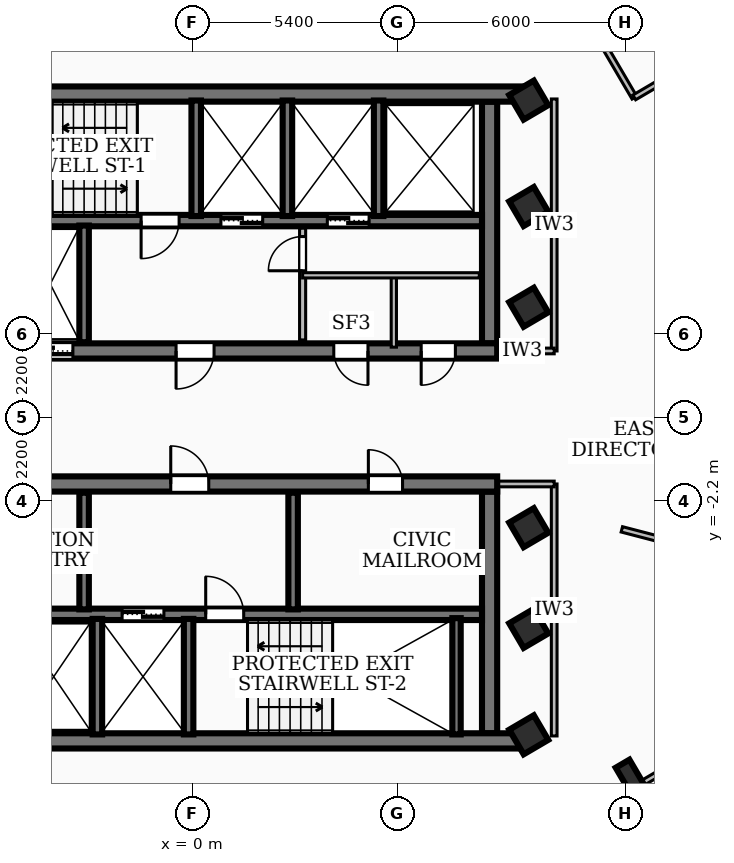
"""IFC4 building model, lengths in metres.
Left out: names, types, materials, properties, quantities, classifications, styles, units other than length and angle.
Written with IfcOpenShell. Run it as: python <this file> out.ifc"""

import sys

from ifc_helpers import new_model, si_unit, direction, frame, frame_2d, origin, origin_2d, place, context, subcontext, project, spatial, rectangle, i_section, extrude, element, fill, save


model = new_model("IFC4")
c1 = context("Model", 3, precision=1e-05, world=origin(), true_north=direction((0.0, 1.0)))
c2 = subcontext(c1, "Body", "Model", "MODEL_VIEW")
j1 = project(units=[si_unit("LENGTHUNIT", "METRE"), si_unit("PLANEANGLEUNIT", "RADIAN")], contexts=[c1])
p1 = place(None, origin())
s1 = spatial("IfcSite", under=j1, at=p1, CompositionType="ELEMENT")
p2 = place(p1, origin())
s2 = spatial("IfcBuilding", under=s1, at=p2, CompositionType="ELEMENT")
p3 = place(p2, frame((0.0, 0.0, 208.62)))
s3 = spatial("IfcBuildingStorey", under=s2, at=p3, CompositionType="ELEMENT", Elevation=208.62)
p4 = place(p3, frame((-8.78, 8.51, 0.0), z_axis=(0.0, 0.0, 1.0), x_axis=(1.0, 0.0, 0.0)))
e1 = element("IfcWall", 1, at=p4, inside=s3, PredefinedType="SHEAR", context=c2, shape_type="SweptSolid", body=[
    extrude(rectangle(XDim=17.56, YDim=0.4, at=frame_2d((8.78, 0.0))), origin(), (0.0, 0.0, 1.0), 3.16),
])
p5 = place(p3, frame((8.02, 1.75, 0.0), z_axis=(0.0, 0.0, 1.0), x_axis=(-1.0, 0.0, 0.0)))
e2 = element("IfcWall", 2, at=p5, inside=s3, PredefinedType="SHEAR", context=c2, shape_type="SweptSolid", body=[
    extrude(rectangle(XDim=16.04, YDim=0.4, at=frame_2d((8.02, 0.0))), origin(), (0.0, 0.0, 1.0), 3.16),
])
p6 = place(p5, frame((7.45, 0.0, 0.0)))
e3 = element("IfcOpeningElement", 3, at=p6, cuts=e2, PredefinedType="OPENING", context=c2, shape_type="SweptSolid", body=[
    extrude(rectangle(XDim=1.0, YDim=2.1, at=frame_2d((0.5, 1.05))), frame((0.0, 0.21, 0.0), z_axis=(0.0, -1.0, 0.0), x_axis=(1.0, 0.0, 0.0)), (0.0, 0.0, 1.0), 0.42),
])
p7 = place(p5, frame((14.285, 0.0, 0.0)))
e4 = element("IfcOpeningElement", 4, at=p7, cuts=e2, PredefinedType="OPENING", context=c2, shape_type="SweptSolid", body=[
    extrude(rectangle(XDim=1.05, YDim=2.15, at=frame_2d((0.525, 1.075))), frame((0.0, 0.21, 0.0), z_axis=(0.0, -1.0, 0.0), x_axis=(1.0, 0.0, 0.0)), (0.0, 0.0, 1.0), 0.42),
])
p8 = place(p5, frame((12.725, 0.0, 0.0)))
e5 = element("IfcOpeningElement", 5, at=p8, cuts=e2, PredefinedType="OPENING", context=c2, shape_type="SweptSolid", body=[
    extrude(rectangle(XDim=1.05, YDim=2.15, at=frame_2d((0.525, 1.075))), frame((0.0, 0.21, 0.0), z_axis=(0.0, -1.0, 0.0), x_axis=(1.0, 0.0, 0.0)), (0.0, 0.0, 1.0), 0.42),
])
p9 = place(p5, frame((11.165, 0.0, 0.0)))
e6 = element("IfcOpeningElement", 6, at=p9, cuts=e2, PredefinedType="OPENING", context=c2, shape_type="SweptSolid", body=[
    extrude(rectangle(XDim=1.05, YDim=2.15, at=frame_2d((0.525, 1.075))), frame((0.0, 0.21, 0.0), z_axis=(0.0, -1.0, 0.0), x_axis=(1.0, 0.0, 0.0)), (0.0, 0.0, 1.0), 0.42),
])
p10 = place(p5, frame((3.4, 0.0, 0.0)))
e7 = element("IfcOpeningElement", 7, at=p10, cuts=e2, PredefinedType="OPENING", context=c2, shape_type="SweptSolid", body=[
    extrude(rectangle(XDim=0.9, YDim=2.06, at=frame_2d((0.45, 1.03))), frame((0.0, 0.21, 0.0), z_axis=(0.0, -1.0, 0.0), x_axis=(1.0, 0.0, 0.0)), (0.0, 0.0, 1.0), 0.42),
])
p11 = place(p5, frame((1.1, 0.0, 0.0)))
e8 = element("IfcOpeningElement", 8, at=p11, cuts=e2, PredefinedType="OPENING", context=c2, shape_type="SweptSolid", body=[
    extrude(rectangle(XDim=0.9, YDim=2.06, at=frame_2d((0.45, 1.03))), frame((0.0, 0.21, 0.0), z_axis=(0.0, -1.0, 0.0), x_axis=(1.0, 0.0, 0.0)), (0.0, 0.0, 1.0), 0.42),
])
p12 = place(p3, frame((7.82, 8.31, 0.0), z_axis=(0.0, 0.0, 1.0), x_axis=(0.0, -1.0, 0.0)))
e9 = element("IfcWall", 9, at=p12, inside=s3, PredefinedType="SHEAR", context=c2, shape_type="SweptSolid", body=[
    extrude(rectangle(XDim=6.36, YDim=0.4, at=frame_2d((3.18, 0.0))), origin(), (0.0, 0.0, 1.0), 3.16),
])
p13 = place(p3, frame((7.62, 5.18, 0.0), z_axis=(0.0, 0.0, 1.0), x_axis=(-1.0, 0.0, 0.0)))
e10 = element("IfcWall", 10, at=p13, inside=s3, PredefinedType="SOLIDWALL", context=c2, shape_type="SweptSolid", body=[
    extrude(rectangle(XDim=15.24, YDim=0.3, at=frame_2d((7.62, 0.0))), origin(), (0.0, 0.0, 1.0), 3.16),
])
p14 = place(p13, frame((5.77, 0.0, 0.0)))
e11 = element("IfcOpeningElement", 11, at=p14, cuts=e10, PredefinedType="OPENING", context=c2, shape_type="SweptSolid", body=[
    extrude(rectangle(XDim=1.1, YDim=2.15, at=frame_2d((0.55, 1.075))), frame((0.0, 0.16, 0.0), z_axis=(0.0, -1.0, 0.0), x_axis=(1.0, 0.0, 0.0)), (0.0, 0.0, 1.0), 0.32),
])
p15 = place(p13, frame((2.97, 0.0, 0.0)))
e12 = element("IfcOpeningElement", 12, at=p15, cuts=e10, PredefinedType="OPENING", context=c2, shape_type="SweptSolid", body=[
    extrude(rectangle(XDim=1.1, YDim=2.15, at=frame_2d((0.55, 1.075))), frame((0.0, 0.16, 0.0), z_axis=(0.0, -1.0, 0.0), x_axis=(1.0, 0.0, 0.0)), (0.0, 0.0, 1.0), 0.32),
])
p16 = place(p13, frame((7.97, 0.0, 0.0)))
e13 = element("IfcOpeningElement", 13, at=p16, cuts=e10, PredefinedType="OPENING", context=c2, shape_type="SweptSolid", body=[
    extrude(rectangle(XDim=1.0, YDim=2.1, at=frame_2d((0.5, 1.05))), frame((0.0, 0.16, 0.0), z_axis=(0.0, -1.0, 0.0), x_axis=(1.0, 0.0, 0.0)), (0.0, 0.0, 1.0), 0.32),
])
p17 = place(p3, frame((8.78, -8.51, 0.0), z_axis=(0.0, 0.0, 1.0), x_axis=(-1.0, 0.0, 0.0)))
e14 = element("IfcWall", 14, at=p17, inside=s3, PredefinedType="SHEAR", context=c2, shape_type="SweptSolid", body=[
    extrude(rectangle(XDim=17.56, YDim=0.4, at=frame_2d((8.78, 0.0))), origin(), (0.0, 0.0, 1.0), 3.16),
])
p18 = place(p3, frame((-8.02, -1.75, 0.0), z_axis=(0.0, 0.0, 1.0), x_axis=(1.0, 0.0, 0.0)))
e15 = element("IfcWall", 15, at=p18, inside=s3, PredefinedType="SHEAR", context=c2, shape_type="SweptSolid", body=[
    extrude(rectangle(XDim=16.04, YDim=0.4, at=frame_2d((8.02, 0.0))), origin(), (0.0, 0.0, 1.0), 3.16),
])
p19 = place(p18, frame((7.45, 0.0, 0.0)))
e16 = element("IfcOpeningElement", 16, at=p19, cuts=e15, PredefinedType="OPENING", context=c2, shape_type="SweptSolid", body=[
    extrude(rectangle(XDim=1.0, YDim=2.1, at=frame_2d((0.5, 1.05))), frame((0.0, 0.21, 0.0), z_axis=(0.0, -1.0, 0.0), x_axis=(1.0, 0.0, 0.0)), (0.0, 0.0, 1.0), 0.42),
])
p20 = place(p18, frame((12.65, 0.0, 0.0)))
e17 = element("IfcOpeningElement", 17, at=p20, cuts=e15, PredefinedType="OPENING", context=c2, shape_type="SweptSolid", body=[
    extrude(rectangle(XDim=0.9, YDim=2.06, at=frame_2d((0.45, 1.03))), frame((0.0, 0.21, 0.0), z_axis=(0.0, -1.0, 0.0), x_axis=(1.0, 0.0, 0.0)), (0.0, 0.0, 1.0), 0.42),
])
p21 = place(p18, frame((2.25, 0.0, 0.0)))
e18 = element("IfcOpeningElement", 18, at=p21, cuts=e15, PredefinedType="OPENING", context=c2, shape_type="SweptSolid", body=[
    extrude(rectangle(XDim=0.9, YDim=2.06, at=frame_2d((0.45, 1.03))), frame((0.0, 0.21, 0.0), z_axis=(0.0, -1.0, 0.0), x_axis=(1.0, 0.0, 0.0)), (0.0, 0.0, 1.0), 0.42),
])
p22 = place(p3, frame((7.82, -1.95, 0.0), z_axis=(0.0, 0.0, 1.0), x_axis=(0.0, -1.0, 0.0)))
e19 = element("IfcWall", 19, at=p22, inside=s3, PredefinedType="SHEAR", context=c2, shape_type="SweptSolid", body=[
    extrude(rectangle(XDim=6.36, YDim=0.4, at=frame_2d((3.18, 0.0))), origin(), (0.0, 0.0, 1.0), 3.16),
])
p23 = place(p3, frame((-7.62, -5.18, 0.0), z_axis=(0.0, 0.0, 1.0), x_axis=(1.0, 0.0, 0.0)))
e20 = element("IfcWall", 20, at=p23, inside=s3, PredefinedType="SOLIDWALL", context=c2, shape_type="SweptSolid", body=[
    extrude(rectangle(XDim=15.24, YDim=0.3, at=frame_2d((7.62, 0.0))), origin(), (0.0, 0.0, 1.0), 3.16),
])
p24 = place(p23, frame((5.77, 0.0, 0.0)))
e21 = element("IfcOpeningElement", 21, at=p24, cuts=e20, PredefinedType="OPENING", context=c2, shape_type="SweptSolid", body=[
    extrude(rectangle(XDim=1.1, YDim=2.15, at=frame_2d((0.55, 1.075))), frame((0.0, 0.16, 0.0), z_axis=(0.0, -1.0, 0.0), x_axis=(1.0, 0.0, 0.0)), (0.0, 0.0, 1.0), 0.32),
])
p25 = place(p23, frame((7.97, 0.0, 0.0)))
e22 = element("IfcOpeningElement", 22, at=p25, cuts=e20, PredefinedType="OPENING", context=c2, shape_type="SweptSolid", body=[
    extrude(rectangle(XDim=1.0, YDim=2.1, at=frame_2d((0.5, 1.05))), frame((0.0, 0.16, 0.0), z_axis=(0.0, -1.0, 0.0), x_axis=(1.0, 0.0, 0.0)), (0.0, 0.0, 1.0), 0.32),
])
p26 = place(p3, frame((6.95, -8.34, 0.0), z_axis=(0.0, 0.0, 1.0), x_axis=(0.0, 1.0, 0.0)))
e23 = element("IfcWall", 23, at=p26, inside=s3, PredefinedType="SOLIDWALL", context=c2, shape_type="SweptSolid", body=[
    extrude(rectangle(XDim=3.06, YDim=0.22, at=frame_2d((1.53, 0.0))), origin(), (0.0, 0.0, 1.0), 3.16),
])
for number, where, z_axis, x_axis in (
    (24, (0.1, 5.3, 0.0), (0.0, 0.0, 1.0), (0.0, 1.0, 0.0)),
    (25, (2.5, 5.3, 0.0), (0.0, 0.0, 1.0), (0.0, 1.0, 0.0)),
    (26, (4.9, 5.3, 0.0), (0.0, 0.0, 1.0), (0.0, 1.0, 0.0)),
):
    element("IfcWall", number, at=place(p3, frame(where, z_axis=z_axis, x_axis=x_axis)), inside=s3, PredefinedType="SOLIDWALL", context=c2, shape_type="SweptSolid", body=[
        extrude(rectangle(XDim=3.04, YDim=0.25, at=frame_2d((1.52, 0.0))), origin(), (0.0, 0.0, 1.0), 3.16),
    ])
p27 = place(p3, frame((-2.85, 1.98, 0.0), z_axis=(0.0, 0.0, 1.0), x_axis=(0.0, 1.0, 0.0)))
e27 = element("IfcWall", 27, at=p27, inside=s3, PredefinedType="SOLIDWALL", context=c2, shape_type="SweptSolid", body=[
    extrude(rectangle(XDim=3.07, YDim=0.25, at=frame_2d((1.535, 0.0))), origin(), (0.0, 0.0, 1.0), 3.16),
])
for number, where, z_axis, x_axis in (
    (28, (-0.1, -8.34, 0.0), (0.0, 0.0, 1.0), (0.0, 1.0, 0.0)),
    (29, (-2.5, -8.34, 0.0), (0.0, 0.0, 1.0), (0.0, 1.0, 0.0)),
):
    element("IfcWall", number, at=place(p3, frame(where, z_axis=z_axis, x_axis=x_axis)), inside=s3, PredefinedType="SOLIDWALL", context=c2, shape_type="SweptSolid", body=[
        extrude(rectangle(XDim=3.04, YDim=0.25, at=frame_2d((1.52, 0.0))), origin(), (0.0, 0.0, 1.0), 3.16),
    ])
for number, where, z_axis, x_axis in (
    (30, (-2.85, -5.05, 0.0), (0.0, 0.0, 1.0), (0.0, 1.0, 0.0)),
    (31, (2.65, -5.05, 0.0), (0.0, 0.0, 1.0), (0.0, 1.0, 0.0)),
):
    element("IfcWall", number, at=place(p3, frame(where, z_axis=z_axis, x_axis=x_axis)), inside=s3, PredefinedType="SOLIDWALL", context=c2, shape_type="SweptSolid", body=[
        extrude(rectangle(XDim=3.07, YDim=0.25, at=frame_2d((1.535, 0.0))), origin(), (0.0, 0.0, 1.0), 3.16),
    ])
for number, where, z_axis, x_axis in (
    (32, (8.85, -5.55, 0.0), (0.0, 0.0, 1.0), (0.863, 0.506, 0.0)),
    (33, (8.85, -2.9, 0.0), (0.0, 0.0, 1.0), (0.863, 0.506, 0.0)),
    (34, (8.85, 2.9, 0.0), (0.0, 0.0, 1.0), (0.863, 0.506, 0.0)),
    (35, (8.85, 5.55, 0.0), (0.0, 0.0, 1.0), (0.863, 0.506, 0.0)),
    (36, (8.85, -8.35, 0.0), (0.0, 0.0, 1.0), (0.863, 0.506, 0.0)),
    (37, (8.85, 8.35, 0.0), (0.0, 0.0, 1.0), (0.863, 0.506, 0.0)),
):
    element("IfcColumn", number, at=place(p3, frame(where, z_axis=z_axis, x_axis=x_axis)), inside=s3, PredefinedType="COLUMN", context=c2, shape_type="SweptSolid", body=[
        extrude(rectangle(XDim=0.75, YDim=0.75, at=origin_2d()), origin(), (0.0, 0.0, 1.0), 3.42),
    ])
p28 = place(p3, frame((11.554, -9.51, 0.0), z_axis=(0.0, 0.0, 1.0), x_axis=(0.862513669207, 0.506033764121, 0.0)))
e38 = element("IfcColumn", 38, at=p28, inside=s3, PredefinedType="COLUMN", context=c2, shape_type="SweptSolid", body=[
    extrude(i_section(OverallWidth=0.418, OverallDepth=0.927, WebThickness=0.019, FlangeThickness=0.032, at=origin_2d()), origin(), (0.0, 0.0, 1.0), 3.42),
])
p29 = place(p3, frame((2.9, 2.04, 0.0), z_axis=(0.0, 0.0, 1.0), x_axis=(0.0, 1.0, 0.0)))
e39 = element("IfcWall", 39, at=p29, inside=s3, PredefinedType="PARTITIONING", context=c2, shape_type="SweptSolid", body=[
    extrude(rectangle(XDim=2.94, YDim=0.16, at=frame_2d((1.47, 0.0))), origin(), (0.0, 0.0, 1.0), 2.39),
])
p30 = place(p29, frame((1.82, 0.0, 0.0)))
e40 = element("IfcOpeningElement", 40, at=p30, cuts=e39, PredefinedType="OPENING", context=c2, shape_type="SweptSolid", body=[
    extrude(rectangle(XDim=0.9, YDim=2.06, at=frame_2d((0.45, 1.03))), frame((0.0, 0.09, 0.0), z_axis=(0.0, -1.0, 0.0), x_axis=(1.0, 0.0, 0.0)), (0.0, 0.0, 1.0), 0.18),
])
p31 = place(p3, frame((2.9, 3.74, 0.0), z_axis=(0.0, 0.0, 1.0), x_axis=(1.0, 0.0, 0.0)))
e41 = element("IfcWall", 41, at=p31, inside=s3, PredefinedType="PARTITIONING", context=c2, shape_type="SweptSolid", body=[
    extrude(rectangle(XDim=4.65, YDim=0.138, at=frame_2d((2.325, 0.0))), origin(), (0.0, 0.0, 1.0), 3.16),
])
p32 = place(p3, frame((5.3, 1.85, 0.0), z_axis=(0.0, 0.0, 1.0), x_axis=(0.0, 1.0, 0.0)))
e42 = element("IfcWall", 42, at=p32, inside=s3, PredefinedType="PARTITIONING", context=c2, shape_type="SweptSolid", body=[
    extrude(rectangle(XDim=1.89, YDim=0.138, at=frame_2d((0.945, 0.0))), origin(), (0.0, 0.0, 1.0), 2.39),
])
p33 = place(p3, frame((9.52, 1.75, 0.0), z_axis=(0.0, 0.0, 1.0), x_axis=(0.0, 1.0, 0.0)))
e43 = element("IfcWall", 43, at=p33, inside=s3, PredefinedType="PARTITIONING", context=c2, shape_type="SweptSolid", body=[
    extrude(rectangle(XDim=6.63, YDim=0.15, at=frame_2d((3.315, 0.0))), origin(), (0.0, 0.0, 1.0), 2.53),
])
p34 = place(p3, frame((7.85, 1.75, 0.0), z_axis=(0.0, 0.0, 1.0), x_axis=(1.0, 0.0, 0.0)))
e44 = element("IfcWall", 44, at=p34, inside=s3, PredefinedType="PARTITIONING", context=c2, shape_type="SweptSolid", body=[
    extrude(rectangle(XDim=1.67, YDim=0.15, at=frame_2d((0.835, 0.0))), origin(), (0.0, 0.0, 1.0), 2.39),
])
p35 = place(p3, frame((9.52, -8.38, 0.0), z_axis=(0.0, 0.0, 1.0), x_axis=(0.0, 1.0, 0.0)))
e45 = element("IfcWall", 45, at=p35, inside=s3, PredefinedType="PARTITIONING", context=c2, shape_type="SweptSolid", body=[
    extrude(rectangle(XDim=6.63, YDim=0.15, at=frame_2d((3.315, 0.0))), origin(), (0.0, 0.0, 1.0), 3.16),
])
p36 = place(p3, frame((7.85, -1.75, 0.0), z_axis=(0.0, 0.0, 1.0), x_axis=(1.0, 0.0, 0.0)))
e46 = element("IfcWall", 46, at=p36, inside=s3, PredefinedType="PARTITIONING", context=c2, shape_type="SweptSolid", body=[
    extrude(rectangle(XDim=1.67, YDim=0.15, at=frame_2d((0.835, 0.0))), origin(), (0.0, 0.0, 1.0), 2.39),
])
p37 = place(p3, frame((11.3, -2.944, 0.0), z_axis=(0.0, 0.0, 1.0), x_axis=(0.967711624716, -0.252059936106, 0.0)))
e47 = element("IfcWall", 47, at=p37, inside=s3, PredefinedType="PARTITIONING", context=c2, shape_type="SweptSolid", body=[
    extrude(rectangle(XDim=8.018, YDim=0.145, at=frame_2d((4.009, 0.0))), origin(), (0.0, 0.0, 1.0), 3.16),
])
p38 = place(p3, frame((11.632, 8.413, 0.0), z_axis=(0.0, 0.0, 1.0), x_axis=(-0.506057561451, 0.862499706955, 0.0)))
e48 = element("IfcWall", 48, at=p38, inside=s3, PredefinedType="PARTITIONING", context=c2, shape_type="SweptSolid", body=[
    extrude(rectangle(XDim=7.95, YDim=0.145, at=frame_2d((3.975, 0.0))), origin(), (0.0, 0.0, 1.0), 2.53),
])
p39 = place(p3, frame((14.654, 10.198, 0.0), z_axis=(0.0, 0.0, 1.0), x_axis=(-0.862375516706, -0.506269165747, 0.0)))
e49 = element("IfcWall", 49, at=p39, inside=s3, PredefinedType="PARTITIONING", context=c2, shape_type="SweptSolid", body=[
    extrude(rectangle(XDim=3.51, YDim=0.145, at=frame_2d((1.755, 0.0))), origin(), (0.0, 0.0, 1.0), 2.53),
])
p40 = place(p39, frame((1.305, 0.0, 0.0)))
e50 = element("IfcOpeningElement", 50, at=p40, cuts=e49, PredefinedType="OPENING", context=c2, shape_type="SweptSolid", body=[
    extrude(rectangle(XDim=1.3, YDim=2.1, at=frame_2d((0.65, 1.05))), frame((0.0, 0.083, 0.0), z_axis=(0.0, -1.0, 0.0), x_axis=(1.0, 0.0, 0.0)), (0.0, 0.0, 1.0), 0.165),
])
p41 = place(p3, frame((12.198, 14.385, 0.0), z_axis=(0.0, 0.0, 1.0), x_axis=(0.506037527975, -0.862511460956, 0.0)))
e51 = element("IfcWall", 51, at=p41, inside=s3, PredefinedType="PARTITIONING", context=c2, shape_type="SweptSolid", body=[
    extrude(rectangle(XDim=12.469, YDim=0.145, at=frame_2d((6.235, 0.0))), origin(), (0.0, 0.0, 1.0), 2.53),
])
p42 = place(p41, frame((6.655, 0.0, 0.0)))
e52 = element("IfcOpeningElement", 52, at=p42, cuts=e51, PredefinedType="OPENING", context=c2, shape_type="SweptSolid", body=[
    extrude(rectangle(XDim=0.86, YDim=2.04, at=frame_2d((0.43, 1.02))), frame((0.0, 0.083, 0.0), z_axis=(0.0, -1.0, 0.0), x_axis=(1.0, 0.0, 0.0)), (0.0, 0.0, 1.0), 0.165),
])
p43 = place(p41, frame((5.455, 0.0, 0.0)))
e53 = element("IfcOpeningElement", 53, at=p43, cuts=e51, PredefinedType="OPENING", context=c2, shape_type="SweptSolid", body=[
    extrude(rectangle(XDim=0.86, YDim=2.04, at=frame_2d((0.43, 1.02))), frame((0.0, 0.083, 0.0), z_axis=(0.0, -1.0, 0.0), x_axis=(1.0, 0.0, 0.0)), (0.0, 0.0, 1.0), 0.165),
])
p44 = place(p3, frame((-15.873, 7.255, 0.0), z_axis=(0.0, 0.0, 1.0), x_axis=(0.862498672631, 0.506059324299, 0.0)))
e54 = element("IfcWall", 54, at=p44, inside=s3, PredefinedType="PARTITIONING", context=c2, shape_type="SweptSolid", body=[
    extrude(rectangle(XDim=20.039, YDim=0.145, at=frame_2d((10.02, 0.0))), origin(), (0.0, 0.0, 1.0), 2.53),
])
p45 = place(p44, frame((9.42, 0.0, 0.0)))
e55 = element("IfcOpeningElement", 55, at=p45, cuts=e54, PredefinedType="OPENING", context=c2, shape_type="SweptSolid", body=[
    extrude(rectangle(XDim=1.2, YDim=2.1, at=frame_2d((0.6, 1.05))), frame((0.0, 0.083, 0.0), z_axis=(0.0, -1.0, 0.0), x_axis=(1.0, 0.0, 0.0)), (0.0, 0.0, 1.0), 0.165),
])
p46 = place(p3, frame((15.873, -7.255, 0.0), z_axis=(0.0, 0.0, 1.0), x_axis=(-0.862498672631, -0.506059324299, 0.0)))
e56 = element("IfcWall", 56, at=p46, inside=s3, PredefinedType="PARTITIONING", context=c2, shape_type="SweptSolid", body=[
    extrude(rectangle(XDim=20.039, YDim=0.145, at=frame_2d((10.02, 0.0))), origin(), (0.0, 0.0, 1.0), 2.53),
])
p47 = place(p46, frame((9.42, 0.0, 0.0)))
e57 = element("IfcOpeningElement", 57, at=p47, cuts=e56, PredefinedType="OPENING", context=c2, shape_type="SweptSolid", body=[
    extrude(rectangle(XDim=1.2, YDim=2.1, at=frame_2d((0.6, 1.05))), frame((0.0, 0.083, 0.0), z_axis=(0.0, -1.0, 0.0), x_axis=(1.0, 0.0, 0.0)), (0.0, 0.0, 1.0), 0.165),
])
p48 = place(p6, origin())
e58 = element("IfcDoor", 58, at=p48, inside=s3, OperationType="SINGLE_SWING_RIGHT", PredefinedType="DOOR", context=c2, shape_type="SweptSolid", body=[
    extrude(rectangle(XDim=1.0, YDim=2.1, at=frame_2d((0.5, 1.05))), frame((0.0, 0.025, 0.0), z_axis=(0.0, -1.0, 0.0), x_axis=(1.0, 0.0, 0.0)), (0.0, 0.0, 1.0), 0.05),
])
fill(e3, e58)
p49 = place(p19, origin())
e59 = element("IfcDoor", 59, at=p49, inside=s3, OperationType="SINGLE_SWING_LEFT", PredefinedType="DOOR", context=c2, shape_type="SweptSolid", body=[
    extrude(rectangle(XDim=1.0, YDim=2.1, at=frame_2d((0.5, 1.05))), frame((0.0, 0.025, 0.0), z_axis=(0.0, -1.0, 0.0), x_axis=(1.0, 0.0, 0.0)), (0.0, 0.0, 1.0), 0.05),
])
fill(e16, e59)
p50 = place(p14, origin())
e60 = element("IfcDoor", 60, at=p50, inside=s3, OperationType="DOUBLE_DOOR_SLIDING", PredefinedType="DOOR", context=c2, shape_type="SweptSolid", body=[
    extrude(rectangle(XDim=1.1, YDim=2.15, at=frame_2d((0.55, 1.075))), frame((0.0, 0.025, 0.0), z_axis=(0.0, -1.0, 0.0), x_axis=(1.0, 0.0, 0.0)), (0.0, 0.0, 1.0), 0.05),
])
fill(e11, e60)
p51 = place(p15, origin())
e61 = element("IfcDoor", 61, at=p51, inside=s3, OperationType="DOUBLE_DOOR_SLIDING", PredefinedType="DOOR", context=c2, shape_type="SweptSolid", body=[
    extrude(rectangle(XDim=1.1, YDim=2.15, at=frame_2d((0.55, 1.075))), frame((0.0, 0.025, 0.0), z_axis=(0.0, -1.0, 0.0), x_axis=(1.0, 0.0, 0.0)), (0.0, 0.0, 1.0), 0.05),
])
fill(e12, e61)
p52 = place(p16, origin())
e62 = element("IfcDoor", 62, at=p52, inside=s3, OperationType="SINGLE_SWING_RIGHT", PredefinedType="DOOR", context=c2, shape_type="SweptSolid", body=[
    extrude(rectangle(XDim=1.0, YDim=2.1, at=frame_2d((0.5, 1.05))), frame((0.0, 0.025, 0.0), z_axis=(0.0, -1.0, 0.0), x_axis=(1.0, 0.0, 0.0)), (0.0, 0.0, 1.0), 0.05),
])
fill(e13, e62)
p53 = place(p24, origin())
e63 = element("IfcDoor", 63, at=p53, inside=s3, OperationType="DOUBLE_DOOR_SLIDING", PredefinedType="DOOR", context=c2, shape_type="SweptSolid", body=[
    extrude(rectangle(XDim=1.1, YDim=2.15, at=frame_2d((0.55, 1.075))), frame((0.0, 0.025, 0.0), z_axis=(0.0, -1.0, 0.0), x_axis=(1.0, 0.0, 0.0)), (0.0, 0.0, 1.0), 0.05),
])
fill(e21, e63)
p54 = place(p25, origin())
e64 = element("IfcDoor", 64, at=p54, inside=s3, OperationType="SINGLE_SWING_LEFT", PredefinedType="DOOR", context=c2, shape_type="SweptSolid", body=[
    extrude(rectangle(XDim=1.0, YDim=2.1, at=frame_2d((0.5, 1.05))), frame((0.0, 0.025, 0.0), z_axis=(0.0, -1.0, 0.0), x_axis=(1.0, 0.0, 0.0)), (0.0, 0.0, 1.0), 0.05),
])
fill(e22, e64)
p55 = place(p9, origin())
e65 = element("IfcDoor", 65, at=p55, inside=s3, OperationType="DOUBLE_DOOR_SLIDING", PredefinedType="DOOR", context=c2, shape_type="SweptSolid", body=[
    extrude(rectangle(XDim=1.05, YDim=2.15, at=frame_2d((0.525, 1.075))), frame((0.0, 0.025, 0.0), z_axis=(0.0, -1.0, 0.0), x_axis=(1.0, 0.0, 0.0)), (0.0, 0.0, 1.0), 0.05),
])
fill(e6, e65)
p56 = place(p20, origin())
e66 = element("IfcDoor", 66, at=p56, inside=s3, OperationType="SINGLE_SWING_LEFT", PredefinedType="DOOR", context=c2, shape_type="SweptSolid", body=[
    extrude(rectangle(XDim=0.9, YDim=2.06, at=frame_2d((0.45, 1.03))), frame((0.0, 0.025, 0.0), z_axis=(0.0, -1.0, 0.0), x_axis=(1.0, 0.0, 0.0)), (0.0, 0.0, 1.0), 0.05),
])
fill(e17, e66)
p57 = place(p10, origin())
e67 = element("IfcDoor", 67, at=p57, inside=s3, OperationType="SINGLE_SWING_LEFT", PredefinedType="DOOR", context=c2, shape_type="SweptSolid", body=[
    extrude(rectangle(XDim=0.9, YDim=2.06, at=frame_2d((0.45, 1.03))), frame((0.0, 0.025, 0.0), z_axis=(0.0, -1.0, 0.0), x_axis=(1.0, 0.0, 0.0)), (0.0, 0.0, 1.0), 0.05),
])
fill(e7, e67)
p58 = place(p11, origin())
e68 = element("IfcDoor", 68, at=p58, inside=s3, OperationType="SINGLE_SWING_RIGHT", PredefinedType="DOOR", context=c2, shape_type="SweptSolid", body=[
    extrude(rectangle(XDim=0.9, YDim=2.06, at=frame_2d((0.45, 1.03))), frame((0.0, 0.025, 0.0), z_axis=(0.0, -1.0, 0.0), x_axis=(1.0, 0.0, 0.0)), (0.0, 0.0, 1.0), 0.05),
])
fill(e8, e68)
p59 = place(p30, origin())
e69 = element("IfcDoor", 69, at=p59, inside=s3, OperationType="SINGLE_SWING_LEFT", PredefinedType="DOOR", context=c2, shape_type="SweptSolid", body=[
    extrude(rectangle(XDim=0.9, YDim=2.06, at=frame_2d((0.45, 1.03))), frame((0.0, 0.025, 0.0), z_axis=(0.0, -1.0, 0.0), x_axis=(1.0, 0.0, 0.0)), (0.0, 0.0, 1.0), 0.05),
])
fill(e40, e69)
save(model, sys.argv[1])
